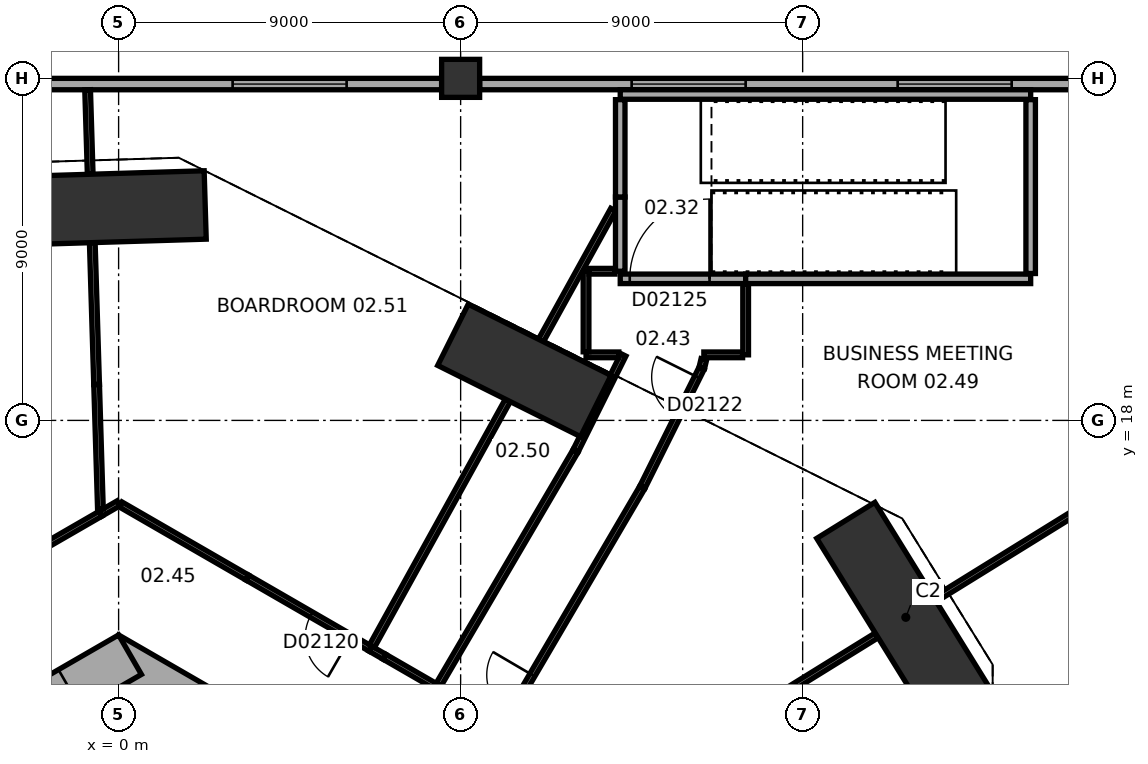
"""IFC4 building model, lengths in metres.
Left out: names, types, materials, properties, quantities, classifications, styles, units other than length and angle.
Written with IfcOpenShell. Run it as: python <this file> out.ifc"""

import sys

from ifc_helpers import new_model, si_unit, direction, frame, frame_2d, origin, origin_2d, place, context, subcontext, project, spatial, rectangle, extrude, element, fill, save


model = new_model("IFC4")
c1 = context("Model", 3, precision=1e-05, world=origin(), true_north=direction((0.0, 1.0)))
c2 = subcontext(c1, "Body", "Model", "MODEL_VIEW")
j1 = project(units=[si_unit("LENGTHUNIT", "METRE"), si_unit("PLANEANGLEUNIT", "RADIAN")], contexts=[c1])
p1 = place(None, origin())
s1 = spatial("IfcSite", under=j1, at=p1, CompositionType="ELEMENT")
p2 = place(p1, origin())
s2 = spatial("IfcBuilding", under=s1, at=p2, CompositionType="ELEMENT")
p3 = place(p2, frame((0.0, 0.0, 13.0)))
s3 = spatial("IfcBuildingStorey", under=s2, at=p3, CompositionType="ELEMENT", Elevation=13.0)
p4 = place(p3, frame((20.714, 12.818, 0.0), z_axis=(0.0, 0.0, 1.0), x_axis=(-0.526210955359, 0.850354061823, 0.0)))
e1 = element("IfcColumn", 1, at=p4, inside=s3, PredefinedType="COLUMN", context=c2, shape_type="SweptSolid", body=[
    extrude(rectangle(XDim=6.0, YDim=1.8, at=origin_2d()), origin(), (0.0, 0.0, 1.0), 8.0),
])
p5 = place(p3, frame((10.677, 19.315, 0.0), z_axis=(0.0, 0.0, 1.0), x_axis=(-0.894935140363, 0.446196251154, 0.0)))
e2 = element("IfcColumn", 2, at=p5, inside=s3, PredefinedType="COLUMN", context=c2, shape_type="SweptSolid", body=[
    extrude(rectangle(XDim=4.2, YDim=1.8, at=origin_2d()), origin(), (0.0, 0.0, 1.0), 8.0),
])
p6 = place(p3, frame((-0.72, 23.577, 0.0), z_axis=(0.0, 0.0, 1.0), x_axis=(-0.999533644135, -0.030536768695, 0.0)))
e3 = element("IfcColumn", 3, at=p6, inside=s3, PredefinedType="COLUMN", context=c2, shape_type="SweptSolid", body=[
    extrude(rectangle(XDim=6.0, YDim=1.8, at=origin_2d()), origin(), (0.0, 0.0, 1.0), 8.0),
])
p7 = place(p3, frame((9.0, 27.0, 0.0), z_axis=(0.0, 0.0, 1.0), x_axis=(1.0, 0.0, 0.0)))
e4 = element("IfcColumn", 4, at=p7, inside=s3, PredefinedType="COLUMN", context=c2, shape_type="SweptSolid", body=[
    extrude(rectangle(XDim=1.0, YDim=1.0, at=origin_2d()), origin(), (0.0, 0.0, 1.0), 8.0),
])
p8 = place(p3, frame((10.4, 5.658, 0.0), z_axis=(0.0, 0.0, 1.0), x_axis=(-0.866021384402, 0.500006961711, 0.0)))
e5 = element("IfcWall", 5, at=p8, inside=s3, PredefinedType="SHEAR", context=c2, shape_type="SweptSolid", body=[
    extrude(rectangle(XDim=12.355, YDim=1.2, at=frame_2d((6.178, 0.0))), origin(), (0.0, 0.0, 1.0), 8.0),
])
p9 = place(p8, frame((2.728, 0.0, 0.0)))
e6 = element("IfcOpeningElement", 6, at=p9, cuts=e5, PredefinedType="OPENING", context=c2, shape_type="SweptSolid", body=[
    extrude(rectangle(XDim=1.1, YDim=2.1, at=frame_2d((0.55, 1.05))), frame((0.0, 0.61, 0.0), z_axis=(0.0, -1.0, 0.0), x_axis=(1.0, 0.0, 0.0)), (0.0, 0.0, 1.0), 1.22),
])
p10 = place(p8, frame((5.328, 0.0, 0.0)))
e7 = element("IfcOpeningElement", 7, at=p10, cuts=e5, PredefinedType="OPENING", context=c2, shape_type="SweptSolid", body=[
    extrude(rectangle(XDim=1.1, YDim=2.1, at=frame_2d((0.55, 1.05))), frame((0.0, 0.61, 0.0), z_axis=(0.0, -1.0, 0.0), x_axis=(1.0, 0.0, 0.0)), (0.0, 0.0, 1.0), 1.22),
])
p11 = place(p8, frame((7.928, 0.0, 0.0)))
e8 = element("IfcOpeningElement", 8, at=p11, cuts=e5, PredefinedType="OPENING", context=c2, shape_type="SweptSolid", body=[
    extrude(rectangle(XDim=1.1, YDim=2.1, at=frame_2d((0.55, 1.05))), frame((0.0, 0.61, 0.0), z_axis=(0.0, -1.0, 0.0), x_axis=(1.0, 0.0, 0.0)), (0.0, 0.0, 1.0), 1.22),
])
p12 = place(p3, frame((0.3, 11.836, 0.0), z_axis=(0.0, 0.0, 1.0), x_axis=(-0.866021384402, -0.500006961711, 0.0)))
e9 = element("IfcWall", 9, at=p12, inside=s3, PredefinedType="SHEAR", context=c2, shape_type="SweptSolid", body=[
    extrude(rectangle(XDim=12.355, YDim=1.2, at=frame_2d((6.178, 0.0))), origin(), (0.0, 0.0, 1.0), 8.0),
])
p13 = place(p12, frame((6.378, 0.0, 0.0)))
e10 = element("IfcOpeningElement", 10, at=p13, cuts=e9, PredefinedType="OPENING", context=c2, shape_type="SweptSolid", body=[
    extrude(rectangle(XDim=1.5, YDim=2.1, at=frame_2d((0.75, 1.05))), frame((0.0, 0.61, 0.0), z_axis=(0.0, -1.0, 0.0), x_axis=(1.0, 0.0, 0.0)), (0.0, 0.0, 1.0), 1.22),
])
p14 = place(p12, frame((1.828, 0.0, 0.0)))
e11 = element("IfcOpeningElement", 11, at=p14, cuts=e9, PredefinedType="OPENING", context=c2, shape_type="SweptSolid", body=[
    extrude(rectangle(XDim=1.1, YDim=2.1, at=frame_2d((0.55, 1.05))), frame((0.0, 0.61, 0.0), z_axis=(0.0, -1.0, 0.0), x_axis=(1.0, 0.0, 0.0)), (0.0, 0.0, 1.0), 1.22),
])
p15 = place(p3, frame((26.5, 26.85, 0.0), z_axis=(0.0, 0.0, 1.0), x_axis=(-1.0, 0.0, 0.0)))
e12 = element("IfcWall", 12, at=p15, inside=s3, PredefinedType="STANDARD", context=c2, shape_type="SweptSolid", body=[
    extrude(rectangle(XDim=17.0, YDim=0.3, at=frame_2d((8.5, 0.0))), origin(), (0.0, 0.0, 1.0), 6.5),
])
p16 = place(p15, frame((3.0, 0.0, 1.0)))
e13 = element("IfcOpeningElement", 13, at=p16, cuts=e12, PredefinedType="OPENING", context=c2, shape_type="SweptSolid", body=[
    extrude(rectangle(XDim=3.0, YDim=4.0, at=frame_2d((1.5, 2.0))), frame((0.0, 0.16, 0.0), z_axis=(0.0, -1.0, 0.0), x_axis=(1.0, 0.0, 0.0)), (0.0, 0.0, 1.0), 0.32),
])
p17 = place(p15, frame((10.0, 0.0, 1.0)))
e14 = element("IfcOpeningElement", 14, at=p17, cuts=e12, PredefinedType="OPENING", context=c2, shape_type="SweptSolid", body=[
    extrude(rectangle(XDim=3.0, YDim=4.0, at=frame_2d((1.5, 2.0))), frame((0.0, 0.16, 0.0), z_axis=(0.0, -1.0, 0.0), x_axis=(1.0, 0.0, 0.0)), (0.0, 0.0, 1.0), 0.32),
])
p18 = place(p3, frame((8.5, 26.85, 0.0), z_axis=(0.0, 0.0, 1.0), x_axis=(-1.0, 0.0, 0.0)))
e15 = element("IfcWall", 15, at=p18, inside=s3, PredefinedType="STANDARD", context=c2, shape_type="SweptSolid", body=[
    extrude(rectangle(XDim=17.0, YDim=0.3, at=frame_2d((8.5, 0.0))), origin(), (0.0, 0.0, 1.0), 6.5),
])
p19 = place(p18, frame((2.5, 0.0, 1.0)))
e16 = element("IfcOpeningElement", 16, at=p19, cuts=e15, PredefinedType="OPENING", context=c2, shape_type="SweptSolid", body=[
    extrude(rectangle(XDim=3.0, YDim=4.0, at=frame_2d((1.5, 2.0))), frame((0.0, 0.16, 0.0), z_axis=(0.0, -1.0, 0.0), x_axis=(1.0, 0.0, 0.0)), (0.0, 0.0, 1.0), 0.32),
])
p20 = place(p18, frame((11.5, 0.0, 1.0)))
e17 = element("IfcOpeningElement", 17, at=p20, cuts=e15, PredefinedType="OPENING", context=c2, shape_type="SweptSolid", body=[
    extrude(rectangle(XDim=3.0, YDim=4.0, at=frame_2d((1.5, 2.0))), frame((0.0, 0.16, 0.0), z_axis=(0.0, -1.0, 0.0), x_axis=(1.0, 0.0, 0.0)), (0.0, 0.0, 1.0), 0.32),
])
p21 = place(p3, frame((8.422, 11.05, 0.0), z_axis=(0.0, 0.0, 1.0), x_axis=(0.50561651199, 0.862758333952, 0.0)))
e18 = element("IfcWall", 18, at=p21, inside=s3, PredefinedType="PARTITIONING", context=c2, shape_type="SweptSolid", body=[
    extrude(rectangle(XDim=7.118, YDim=0.15, at=frame_2d((3.559, 0.0))), origin(), (0.0, 0.0, 1.0), 6.9),
])
p22 = place(p3, frame((6.995, 11.781, 0.0), z_axis=(0.0, 0.0, 1.0), x_axis=(0.866076391369, -0.499911676512, 0.0)))
e19 = element("IfcWall", 19, at=p22, inside=s3, PredefinedType="PARTITIONING", context=c2, shape_type="SweptSolid", body=[
    extrude(rectangle(XDim=1.601, YDim=0.15, at=frame_2d((0.8, 0.0))), origin(), (0.0, 0.0, 1.0), 7.7),
])
p23 = place(p3, frame((6.995, 11.781, 0.0), z_axis=(0.0, 0.0, 1.0), x_axis=(-0.866281716711, 0.49955578997, 0.0)))
e20 = element("IfcWall", 20, at=p23, inside=s3, PredefinedType="PARTITIONING", context=c2, shape_type="SweptSolid", body=[
    extrude(rectangle(XDim=0.423, YDim=0.15, at=frame_2d((0.211, 0.0))), origin(), (0.0, 0.0, 1.0), 7.7),
])
p24 = place(p3, frame((6.629, 11.992, 0.0), z_axis=(0.0, 0.0, 1.0), x_axis=(-0.86599558016, 0.500051652475, 0.0)))
e21 = element("IfcWall", 21, at=p24, inside=s3, PredefinedType="PARTITIONING", context=c2, shape_type="SweptSolid", body=[
    extrude(rectangle(XDim=3.745, YDim=0.15, at=frame_2d((1.872, 0.0))), origin(), (0.0, 0.0, 1.0), 7.7),
])
p25 = place(p24, frame((0.6, 0.0, 0.0)))
e22 = element("IfcOpeningElement", 22, at=p25, cuts=e21, PredefinedType="OPENING", context=c2, shape_type="SweptSolid", body=[
    extrude(rectangle(XDim=1.2, YDim=2.1, at=frame_2d((0.6, 1.05))), frame((0.0, 0.085, 0.0), z_axis=(0.0, -1.0, 0.0), x_axis=(1.0, 0.0, 0.0)), (0.0, 0.0, 1.0), 0.17),
])
p26 = place(p3, frame((6.668, 12.062, 0.0), z_axis=(0.0, 0.0, 1.0), x_axis=(0.483795376692, 0.875181143245, 0.0)))
e23 = element("IfcWall", 23, at=p26, inside=s3, PredefinedType="PARTITIONING", context=c2, shape_type="SweptSolid", body=[
    extrude(rectangle(XDim=7.387, YDim=0.15, at=frame_2d((3.693, 0.0))), origin(), (0.0, 0.0, 1.0), 7.7),
])
p27 = place(p3, frame((19.949, 12.345, 0.0), z_axis=(0.0, 0.0, 1.0), x_axis=(-0.850341306025, -0.526231568102, 0.0)))
e24 = element("IfcWall", 24, at=p27, inside=s3, PredefinedType="MOVABLE", context=c2, shape_type="SweptSolid", body=[
    extrude(rectangle(XDim=7.787, YDim=0.15, at=frame_2d((3.894, 0.0))), origin(), (0.0, 0.0, 1.0), 7.7),
])
p28 = place(p3, frame((21.479, 13.292, 0.0), z_axis=(0.0, 0.0, 1.0), x_axis=(0.850365065786, 0.5261931726, 0.0)))
e25 = element("IfcWall", 25, at=p28, inside=s3, PredefinedType="PARTITIONING", context=c2, shape_type="SweptSolid", body=[
    extrude(rectangle(XDim=6.352, YDim=0.15, at=frame_2d((3.176, 0.0))), origin(), (0.0, 0.0, 1.0), 7.7),
])
p29 = place(p3, frame((3.386, 13.865, 0.0), z_axis=(0.0, 0.0, 1.0), x_axis=(-0.866006051527, 0.500033517596, 0.0)))
e26 = element("IfcWall", 26, at=p29, inside=s3, PredefinedType="PARTITIONING", context=c2, shape_type="SweptSolid", body=[
    extrude(rectangle(XDim=3.85, YDim=0.15, at=frame_2d((1.925, 0.0))), origin(), (0.0, 0.0, 1.0), 7.7),
])
p30 = place(p3, frame((-2.087, 14.615, 0.0), z_axis=(0.0, 0.0, 1.0), x_axis=(0.866006459158, 0.500032811619, 0.0)))
e27 = element("IfcWall", 27, at=p30, inside=s3, PredefinedType="PARTITIONING", context=c2, shape_type="SweptSolid", body=[
    extrude(rectangle(XDim=1.861, YDim=0.15, at=frame_2d((0.931, 0.0))), origin(), (0.0, 0.0, 1.0), 7.7),
])
p31 = place(p3, frame((-0.475, 15.545, 0.0), z_axis=(0.0, 0.0, 1.0), x_axis=(0.865933599817, 0.500158975434, 0.0)))
e28 = element("IfcWall", 28, at=p31, inside=s3, PredefinedType="PARTITIONING", context=c2, shape_type="SweptSolid", body=[
    extrude(rectangle(XDim=0.549, YDim=0.15, at=frame_2d((0.274, 0.0))), origin(), (0.0, 0.0, 1.0), 7.7),
])
p32 = place(p3, frame((13.772, 16.224, 0.0), z_axis=(0.0, 0.0, 1.0), x_axis=(-0.505547889018, -0.862798546539, 0.0)))
e29 = element("IfcWall", 29, at=p32, inside=s3, PredefinedType="PARTITIONING", context=c2, shape_type="SweptSolid", body=[
    extrude(rectangle(XDim=7.156, YDim=0.15, at=frame_2d((3.578, 0.0))), origin(), (0.0, 0.0, 1.0), 7.7),
])
p33 = place(p32, frame((5.706, 0.0, 0.0)))
e30 = element("IfcOpeningElement", 30, at=p33, cuts=e29, PredefinedType="OPENING", context=c2, shape_type="SweptSolid", body=[
    extrude(rectangle(XDim=1.2, YDim=2.1, at=frame_2d((0.6, 1.05))), frame((0.0, 0.085, 0.0), z_axis=(0.0, -1.0, 0.0), x_axis=(1.0, 0.0, 0.0)), (0.0, 0.0, 1.0), 0.17),
])
p34 = place(p3, frame((12.03, 17.209, 0.0), z_axis=(0.0, 0.0, 1.0), x_axis=(0.445753790741, 0.89515560549, 0.0)))
e31 = element("IfcWall", 31, at=p34, inside=s3, PredefinedType="PARTITIONING", context=c2, shape_type="SweptSolid", body=[
    extrude(rectangle(XDim=2.811, YDim=0.15, at=frame_2d((1.405, 0.0))), origin(), (0.0, 0.0, 1.0), 7.7),
])
p35 = place(p3, frame((-0.579, 18.946, 0.0), z_axis=(0.0, 0.0, 1.0), x_axis=(0.030572886356, -0.999532540051, 0.0)))
e32 = element("IfcWall", 32, at=p35, inside=s3, PredefinedType="PARTITIONING", context=c2, shape_type="SweptSolid", body=[
    extrude(rectangle(XDim=3.282, YDim=0.15, at=frame_2d((1.641, 0.0))), origin(), (0.0, 0.0, 1.0), 7.7),
])
p36 = place(p3, frame((-0.579, 18.946, 0.0), z_axis=(0.0, 0.0, 1.0), x_axis=(-0.030471255388, 0.999535643484, 0.0)))
e33 = element("IfcWall", 33, at=p36, inside=s3, PredefinedType="PARTITIONING", context=c2, shape_type="SweptSolid", body=[
    extrude(rectangle(XDim=3.734, YDim=0.15, at=frame_2d((1.867, 0.0))), origin(), (0.0, 0.0, 1.0), 7.7),
])
p37 = place(p3, frame((15.338, 19.365, 0.0), z_axis=(0.0, 0.0, 1.0), x_axis=(-0.44583629063, -0.895114518906, 0.0)))
e34 = element("IfcWall", 34, at=p37, inside=s3, PredefinedType="PARTITIONING", context=c2, shape_type="SweptSolid", body=[
    extrude(rectangle(XDim=3.476, YDim=0.15, at=frame_2d((1.738, 0.0))), origin(), (0.0, 0.0, 1.0), 7.7),
])
p38 = place(p37, frame((0.25, 0.0, 0.0)))
e35 = element("IfcOpeningElement", 35, at=p38, cuts=e34, PredefinedType="OPENING", context=c2, shape_type="SweptSolid", body=[
    extrude(rectangle(XDim=1.2, YDim=2.1, at=frame_2d((0.6, 1.05))), frame((0.0, 0.085, 0.0), z_axis=(0.0, -1.0, 0.0), x_axis=(1.0, 0.0, 0.0)), (0.0, 0.0, 1.0), 0.17),
])
p39 = place(p3, frame((15.4, 19.609, 0.0), z_axis=(0.0, 0.0, 1.0), x_axis=(-0.228393975948, -0.973568791484, 0.0)))
e36 = element("IfcWall", 36, at=p39, inside=s3, PredefinedType="PARTITIONING", context=c2, shape_type="SweptSolid", body=[
    extrude(rectangle(XDim=0.232, YDim=0.15, at=frame_2d((0.116, 0.0))), origin(), (0.0, 0.0, 1.0), 7.7),
])
p40 = place(p3, frame((13.163, 19.725, 0.0), z_axis=(0.0, 0.0, 1.0), x_axis=(-1.0, 0.0, 0.0)))
e37 = element("IfcWall", 37, at=p40, inside=s3, PredefinedType="PARTITIONING", context=c2, shape_type="SweptSolid", body=[
    extrude(rectangle(XDim=0.863, YDim=0.15, at=frame_2d((0.432, 0.0))), origin(), (0.0, 0.0, 1.0), 7.7),
])
p41 = place(p3, frame((16.42, 19.725, 0.0), z_axis=(0.0, 0.0, 1.0), x_axis=(-1.0, 0.0, 0.0)))
e38 = element("IfcWall", 38, at=p41, inside=s3, PredefinedType="PARTITIONING", context=c2, shape_type="SweptSolid", body=[
    extrude(rectangle(XDim=1.02, YDim=0.15, at=frame_2d((0.51, 0.0))), origin(), (0.0, 0.0, 1.0), 7.7),
])
p42 = place(p3, frame((12.3, 19.805, 0.0), z_axis=(0.0, 0.0, 1.0), x_axis=(0.0, 1.0, 0.0)))
e39 = element("IfcWall", 39, at=p42, inside=s3, PredefinedType="PARTITIONING", context=c2, shape_type="SweptSolid", body=[
    extrude(rectangle(XDim=2.12, YDim=0.15, at=frame_2d((1.06, 0.0))), origin(), (0.0, 0.0, 1.0), 7.7),
])
p43 = place(p3, frame((11.113, 20.104, 0.0), z_axis=(0.0, 0.0, 1.0), x_axis=(0.483823742959, 0.875165461927, 0.0)))
e40 = element("IfcWall", 40, at=p43, inside=s3, PredefinedType="PARTITIONING", context=c2, shape_type="SweptSolid", body=[
    extrude(rectangle(XDim=3.933, YDim=0.15, at=frame_2d((1.967, 0.0))), origin(), (0.0, 0.0, 1.0), 7.7),
])
p44 = place(p3, frame((16.5, 21.585, 0.0), z_axis=(0.0, 0.0, 1.0), x_axis=(0.0, -1.0, 0.0)))
e41 = element("IfcWall", 41, at=p44, inside=s3, PredefinedType="PARTITIONING", context=c2, shape_type="SweptSolid", body=[
    extrude(rectangle(XDim=1.86, YDim=0.15, at=frame_2d((0.93, 0.0))), origin(), (0.0, 0.0, 1.0), 7.7),
])
p45 = place(p3, frame((16.5, 21.725, 0.0), z_axis=(0.0, 0.0, 1.0), x_axis=(-1.0, 0.0, 0.0)))
e42 = element("IfcWall", 42, at=p45, inside=s3, PredefinedType="SOLIDWALL", context=c2, shape_type="SweptSolid", body=[
    extrude(rectangle(XDim=3.3, YDim=0.25, at=frame_2d((1.65, 0.0))), origin(), (0.0, 0.0, 1.0), 7.7),
])
p46 = place(p45, frame((0.95, 0.0, 0.0)))
e43 = element("IfcOpeningElement", 43, at=p46, cuts=e42, PredefinedType="OPENING", context=c2, shape_type="SweptSolid", body=[
    extrude(rectangle(XDim=2.1, YDim=2.4, at=frame_2d((1.05, 1.2))), frame((0.0, 0.135, 0.0), z_axis=(0.0, -1.0, 0.0), x_axis=(1.0, 0.0, 0.0)), (0.0, 0.0, 1.0), 0.27),
])
p47 = place(p3, frame((24.0, 21.725, 0.0), z_axis=(0.0, 0.0, 1.0), x_axis=(-1.0, 0.0, 0.0)))
e44 = element("IfcWall", 44, at=p47, inside=s3, PredefinedType="SOLIDWALL", context=c2, shape_type="SweptSolid", body=[
    extrude(rectangle(XDim=7.5, YDim=0.25, at=frame_2d((3.75, 0.0))), origin(), (0.0, 0.0, 1.0), 7.7),
])
p48 = place(p3, frame((12.38, 21.925, 0.0), z_axis=(0.0, 0.0, 1.0), x_axis=(1.0, 0.0, 0.0)))
e45 = element("IfcWall", 45, at=p48, inside=s3, PredefinedType="PARTITIONING", context=c2, shape_type="SweptSolid", body=[
    extrude(rectangle(XDim=0.68, YDim=0.15, at=frame_2d((0.34, 0.0))), origin(), (0.0, 0.0, 1.0), 7.7),
])
p49 = place(p3, frame((13.2, 21.925, 0.0), z_axis=(0.0, 0.0, 1.0), x_axis=(0.0, 1.0, 0.0)))
e46 = element("IfcWall", 46, at=p49, inside=s3, PredefinedType="SOLIDWALL", context=c2, shape_type="SweptSolid", body=[
    extrude(rectangle(XDim=1.953, YDim=0.25, at=frame_2d((0.977, 0.0))), origin(), (0.0, 0.0, 1.0), 7.7),
])
p50 = place(p3, frame((13.2, 23.878, 0.0), z_axis=(0.0, 0.0, 1.0), x_axis=(0.0, 1.0, 0.0)))
e47 = element("IfcWall", 47, at=p50, inside=s3, PredefinedType="SOLIDWALL", context=c2, shape_type="SweptSolid", body=[
    extrude(rectangle(XDim=2.562, YDim=0.25, at=frame_2d((1.281, 0.0))), origin(), (0.0, 0.0, 1.0), 7.7),
])
p51 = place(p3, frame((-0.748, 24.477, 0.0), z_axis=(0.0, 0.0, 1.0), x_axis=(-0.030405439098, 0.999537647752, 0.0)))
e48 = element("IfcWall", 48, at=p51, inside=s3, PredefinedType="PARTITIONING", context=c2, shape_type="SweptSolid", body=[
    extrude(rectangle(XDim=2.224, YDim=0.15, at=frame_2d((1.112, 0.0))), origin(), (0.0, 0.0, 1.0), 7.7),
])
p52 = place(p3, frame((24.0, 26.44, 0.0), z_axis=(0.0, 0.0, 1.0), x_axis=(0.0, -1.0, 0.0)))
e49 = element("IfcWall", 49, at=p52, inside=s3, PredefinedType="SOLIDWALL", context=c2, shape_type="SweptSolid", body=[
    extrude(rectangle(XDim=4.575, YDim=0.25, at=frame_2d((2.288, 0.0))), origin(), (0.0, 0.0, 1.0), 7.7),
])
p53 = place(p3, frame((24.0, 26.575, 0.0), z_axis=(0.0, 0.0, 1.0), x_axis=(-1.0, 0.0, 0.0)))
e50 = element("IfcWall", 50, at=p53, inside=s3, PredefinedType="SOLIDWALL", context=c2, shape_type="SweptSolid", body=[
    extrude(rectangle(XDim=10.8, YDim=0.25, at=frame_2d((5.4, 0.0))), origin(), (0.0, 0.0, 1.0), 7.7),
])
p54 = place(p16, origin())
e51 = element("IfcWindow", 51, at=p54, inside=s3, PartitioningType="SINGLE_PANEL", PredefinedType="WINDOW", context=c2, shape_type="SweptSolid", body=[
    extrude(rectangle(XDim=3.0, YDim=4.0, at=frame_2d((1.5, 2.0))), frame((0.0, 0.03, 0.0), z_axis=(0.0, -1.0, 0.0), x_axis=(1.0, 0.0, 0.0)), (0.0, 0.0, 1.0), 0.06),
])
fill(e13, e51)
p55 = place(p17, origin())
e52 = element("IfcWindow", 52, at=p55, inside=s3, PartitioningType="SINGLE_PANEL", PredefinedType="WINDOW", context=c2, shape_type="SweptSolid", body=[
    extrude(rectangle(XDim=3.0, YDim=4.0, at=frame_2d((1.5, 2.0))), frame((0.0, 0.03, 0.0), z_axis=(0.0, -1.0, 0.0), x_axis=(1.0, 0.0, 0.0)), (0.0, 0.0, 1.0), 0.06),
])
fill(e14, e52)
p56 = place(p19, origin())
e53 = element("IfcWindow", 53, at=p56, inside=s3, PartitioningType="SINGLE_PANEL", PredefinedType="WINDOW", context=c2, shape_type="SweptSolid", body=[
    extrude(rectangle(XDim=3.0, YDim=4.0, at=frame_2d((1.5, 2.0))), frame((0.0, 0.03, 0.0), z_axis=(0.0, -1.0, 0.0), x_axis=(1.0, 0.0, 0.0)), (0.0, 0.0, 1.0), 0.06),
])
fill(e16, e53)
p57 = place(p25, origin())
e54 = element("IfcDoor", 54, at=p57, inside=s3, OperationType="SINGLE_SWING_LEFT", PredefinedType="DOOR", context=c2, shape_type="SweptSolid", body=[
    extrude(rectangle(XDim=1.2, YDim=2.1, at=frame_2d((0.6, 1.05))), frame((0.0, 0.025, 0.0), z_axis=(0.0, -1.0, 0.0), x_axis=(1.0, 0.0, 0.0)), (0.0, 0.0, 1.0), 0.05),
])
fill(e22, e54)
p58 = place(p33, origin())
e55 = element("IfcDoor", 55, at=p58, inside=s3, OperationType="SINGLE_SWING_LEFT", PredefinedType="DOOR", context=c2, shape_type="SweptSolid", body=[
    extrude(rectangle(XDim=1.2, YDim=2.1, at=frame_2d((0.6, 1.05))), frame((0.0, 0.025, 0.0), z_axis=(0.0, -1.0, 0.0), x_axis=(1.0, 0.0, 0.0)), (0.0, 0.0, 1.0), 0.05),
])
fill(e30, e55)
p59 = place(p38, origin())
e56 = element("IfcDoor", 56, at=p59, inside=s3, OperationType="SINGLE_SWING_LEFT", PredefinedType="DOOR", context=c2, shape_type="SweptSolid", body=[
    extrude(rectangle(XDim=1.2, YDim=2.1, at=frame_2d((0.6, 1.05))), frame((0.0, 0.025, 0.0), z_axis=(0.0, -1.0, 0.0), x_axis=(1.0, 0.0, 0.0)), (0.0, 0.0, 1.0), 0.05),
])
fill(e35, e56)
p60 = place(p46, frame((2.1, 0.0, 0.0), z_axis=(0.0, 0.0, 1.0), x_axis=(-1.0, 0.0, 0.0)))
e57 = element("IfcDoor", 57, at=p60, inside=s3, OperationType="DOUBLE_DOOR_SINGLE_SWING", PredefinedType="DOOR", context=c2, shape_type="SweptSolid", body=[
    extrude(rectangle(XDim=2.1, YDim=2.4, at=frame_2d((1.05, 1.2))), frame((0.0, 0.025, 0.0), z_axis=(0.0, -1.0, 0.0), x_axis=(1.0, 0.0, 0.0)), (0.0, 0.0, 1.0), 0.05),
])
fill(e43, e57)
save(model, sys.argv[1])
